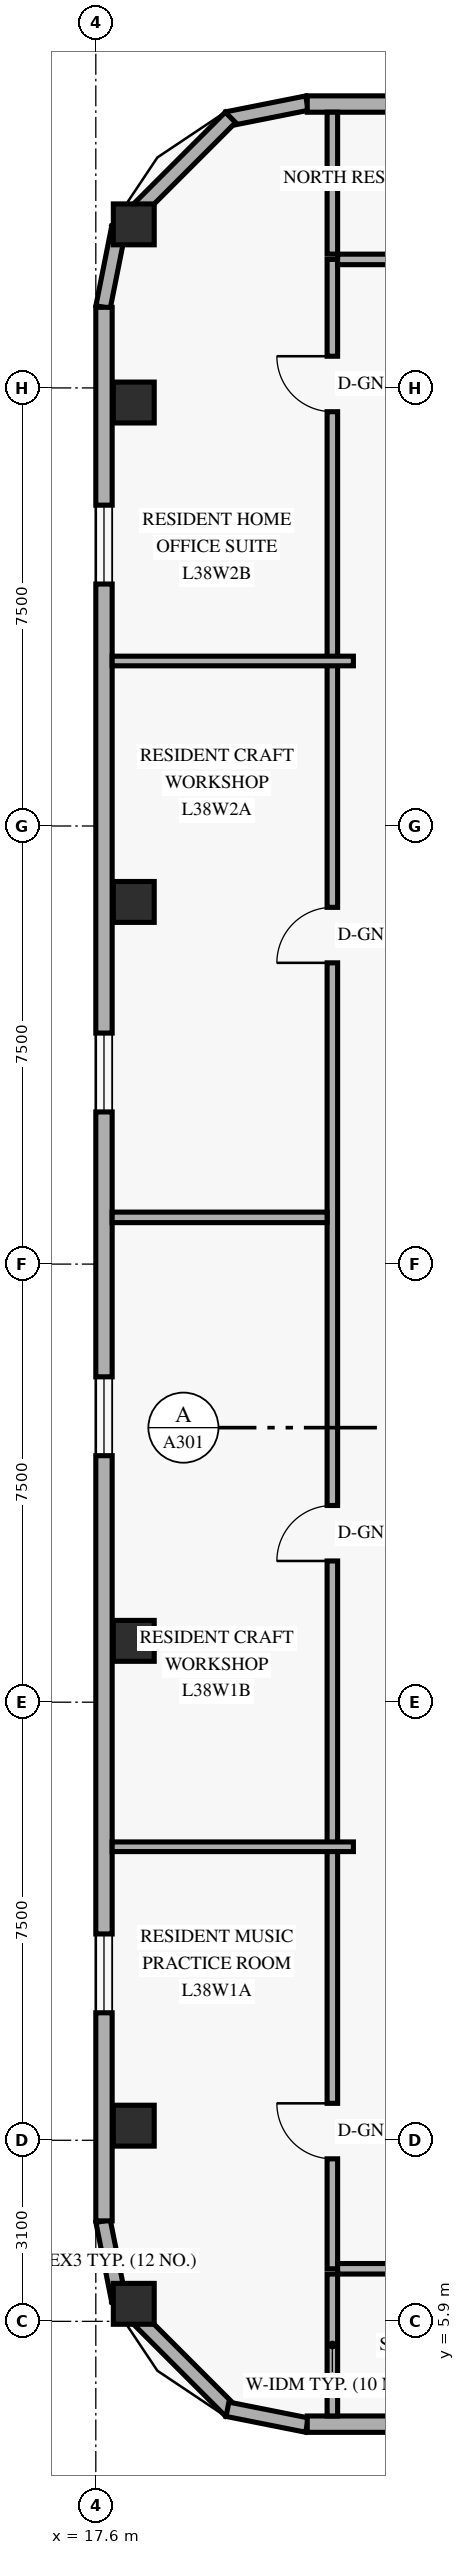
"""IFC4 building model, lengths in metres.
Left out: names, types, materials, properties, quantities, classifications, styles, units other than length and angle.
Written with IfcOpenShell. Run it as: python <this file> out.ifc"""

import sys

from ifc_helpers import new_model, si_unit, direction, frame, frame_2d, origin, origin_2d, place, context, subcontext, project, spatial, rectangle, extrude, element, fill, save


model = new_model("IFC4")
c1 = context("Model", 3, precision=1e-05, world=origin(), true_north=direction((0.0, 1.0)))
c2 = subcontext(c1, "Body", "Model", "MODEL_VIEW")
j1 = project(units=[si_unit("LENGTHUNIT", "METRE"), si_unit("PLANEANGLEUNIT", "RADIAN")], contexts=[c1])
p1 = place(None, origin())
s1 = spatial("IfcSite", under=j1, at=p1, CompositionType="ELEMENT")
p2 = place(p1, origin())
s2 = spatial("IfcBuilding", under=s1, at=p2, CompositionType="ELEMENT")
p3 = place(p2, frame((0.0, 0.0, 148.2)))
s3 = spatial("IfcBuildingStorey", under=s2, at=p3, CompositionType="ELEMENT", Elevation=148.2)
for number, where, z_axis, x_axis in (
    (1, (18.25, 6.2, 0.0), (0.0, 0.0, 1.0), (1.0, 0.0, 0.0)),
    (2, (18.25, 9.25, 0.0), (0.0, 0.0, 1.0), (1.0, 0.0, 0.0)),
    (3, (18.25, 17.55, 0.0), (0.0, 0.0, 1.0), (1.0, 0.0, 0.0)),
    (4, (18.25, 30.2, 0.0), (0.0, 0.0, 1.0), (1.0, 0.0, 0.0)),
    (5, (18.25, 38.75, 0.0), (0.0, 0.0, 1.0), (1.0, 0.0, 0.0)),
    (6, (18.25, 41.8, 0.0), (0.0, 0.0, 1.0), (1.0, 0.0, 0.0)),
):
    element("IfcColumn", number, at=place(p3, frame(where, z_axis=z_axis, x_axis=x_axis)), inside=s3, PredefinedType="COLUMN", context=c2, shape_type="SweptSolid", body=[
        extrude(rectangle(XDim=0.7, YDim=0.7, at=origin_2d()), origin(), (0.0, 0.0, 1.0), 3.6),
    ])
p4 = place(p3, frame((17.724, 7.616, 0.0), z_axis=(0.0, 0.0, 1.0), x_axis=(0.195135625965, -0.9807762678, 0.0)))
e7 = element("IfcWall", 7, at=p4, inside=s3, PredefinedType="SOLIDWALL", context=c2, shape_type="SweptSolid", body=[
    extrude(rectangle(XDim=1.389, YDim=0.25, at=frame_2d((0.694, 0.0))), origin(), (0.0, 0.0, 1.0), 3.36),
])
p5 = place(p3, frame((17.968, 6.305, 0.0), z_axis=(0.0, 0.0, 1.0), x_axis=(0.707106781187, -0.707106781187, 0.0)))
e8 = element("IfcWall", 8, at=p5, inside=s3, PredefinedType="SOLIDWALL", context=c2, shape_type="SweptSolid", body=[
    extrude(rectangle(XDim=2.739, YDim=0.25, at=frame_2d((1.37, 0.0))), origin(), (0.0, 0.0, 1.0), 3.36),
])
for number, where, z_axis, x_axis in (
    (9, (19.854, 4.395, 0.0), (0.0, 0.0, 1.0), (0.981, -0.195, 0.0)),
    (10, (21.217, 43.876, 0.0), (0.0, 0.0, 1.0), (-0.981, -0.195, 0.0)),
):
    element("IfcWall", number, at=place(p3, frame(where, z_axis=z_axis, x_axis=x_axis)), inside=s3, PredefinedType="SOLIDWALL", context=c2, shape_type="SweptSolid", body=[
        extrude(rectangle(XDim=1.389, YDim=0.25, at=frame_2d((0.694, 0.0))), origin(), (0.0, 0.0, 1.0), 3.36),
    ])
p6 = place(p3, frame((19.905, 43.632, 0.0), z_axis=(0.0, 0.0, 1.0), x_axis=(-0.707106781187, -0.707106781187, 0.0)))
e11 = element("IfcWall", 11, at=p6, inside=s3, PredefinedType="SOLIDWALL", context=c2, shape_type="SweptSolid", body=[
    extrude(rectangle(XDim=2.739, YDim=0.25, at=frame_2d((1.37, 0.0))), origin(), (0.0, 0.0, 1.0), 3.36),
])
p7 = place(p3, frame((17.995, 41.746, 0.0), z_axis=(0.0, 0.0, 1.0), x_axis=(-0.195135625965, -0.9807762678, 0.0)))
e12 = element("IfcWall", 12, at=p7, inside=s3, PredefinedType="SOLIDWALL", context=c2, shape_type="SweptSolid", body=[
    extrude(rectangle(XDim=1.389, YDim=0.25, at=frame_2d((0.694, 0.0))), origin(), (0.0, 0.0, 1.0), 3.36),
])
p8 = place(p3, frame((21.22, 4.14, 0.0), z_axis=(0.0, 0.0, 1.0), x_axis=(1.0, 0.0, 0.0)))
e13 = element("IfcWall", 13, at=p8, inside=s3, PredefinedType="SOLIDWALL", context=c2, shape_type="SweptSolid", body=[
    extrude(rectangle(XDim=33.76, YDim=0.28, at=frame_2d((16.88, 0.0))), origin(), (0.0, 0.0, 1.0), 3.36),
])
p9 = place(p8, frame((2.905, 0.0, 0.85)))
e14 = element("IfcOpeningElement", 14, at=p9, cuts=e13, PredefinedType="OPENING", context=c2, shape_type="SweptSolid", body=[
    extrude(rectangle(XDim=1.2, YDim=1.5, at=frame_2d((0.6, 0.75))), frame((0.0, 0.15, 0.0), z_axis=(0.0, -1.0, 0.0), x_axis=(1.0, 0.0, 0.0)), (0.0, 0.0, 1.0), 0.3),
])
p10 = place(p8, frame((9.79, 0.0, 0.85)))
e15 = element("IfcOpeningElement", 15, at=p10, cuts=e13, PredefinedType="OPENING", context=c2, shape_type="SweptSolid", body=[
    extrude(rectangle(XDim=1.2, YDim=1.5, at=frame_2d((0.6, 0.75))), frame((0.0, 0.15, 0.0), z_axis=(0.0, -1.0, 0.0), x_axis=(1.0, 0.0, 0.0)), (0.0, 0.0, 1.0), 0.3),
])
p11 = place(p8, frame((15.065, 0.0, 0.85)))
e16 = element("IfcOpeningElement", 16, at=p11, cuts=e13, PredefinedType="OPENING", context=c2, shape_type="SweptSolid", body=[
    extrude(rectangle(XDim=1.2, YDim=1.5, at=frame_2d((0.6, 0.75))), frame((0.0, 0.15, 0.0), z_axis=(0.0, -1.0, 0.0), x_axis=(1.0, 0.0, 0.0)), (0.0, 0.0, 1.0), 0.3),
])
p12 = place(p8, frame((19.625, 0.0, 0.85)))
e17 = element("IfcOpeningElement", 17, at=p12, cuts=e13, PredefinedType="OPENING", context=c2, shape_type="SweptSolid", body=[
    extrude(rectangle(XDim=1.2, YDim=1.5, at=frame_2d((0.6, 0.75))), frame((0.0, 0.15, 0.0), z_axis=(0.0, -1.0, 0.0), x_axis=(1.0, 0.0, 0.0)), (0.0, 0.0, 1.0), 0.3),
])
p13 = place(p8, frame((24.45, 0.0, 0.85)))
e18 = element("IfcOpeningElement", 18, at=p13, cuts=e13, PredefinedType="OPENING", context=c2, shape_type="SweptSolid", body=[
    extrude(rectangle(XDim=1.2, YDim=1.5, at=frame_2d((0.6, 0.75))), frame((0.0, 0.15, 0.0), z_axis=(0.0, -1.0, 0.0), x_axis=(1.0, 0.0, 0.0)), (0.0, 0.0, 1.0), 0.3),
])
p14 = place(p8, frame((27.08, 0.0, 0.85)))
e19 = element("IfcOpeningElement", 19, at=p14, cuts=e13, PredefinedType="OPENING", context=c2, shape_type="SweptSolid", body=[
    extrude(rectangle(XDim=1.2, YDim=1.5, at=frame_2d((0.6, 0.75))), frame((0.0, 0.15, 0.0), z_axis=(0.0, -1.0, 0.0), x_axis=(1.0, 0.0, 0.0)), (0.0, 0.0, 1.0), 0.3),
])
p15 = place(p8, frame((30.57, 0.0, 0.85)))
e20 = element("IfcOpeningElement", 20, at=p15, cuts=e13, PredefinedType="OPENING", context=c2, shape_type="SweptSolid", body=[
    extrude(rectangle(XDim=1.2, YDim=1.5, at=frame_2d((0.6, 0.75))), frame((0.0, 0.15, 0.0), z_axis=(0.0, -1.0, 0.0), x_axis=(1.0, 0.0, 0.0)), (0.0, 0.0, 1.0), 0.3),
])
p16 = place(p3, frame((54.98, 43.86, 0.0), z_axis=(0.0, 0.0, 1.0), x_axis=(-1.0, 0.0, 0.0)))
e21 = element("IfcWall", 21, at=p16, inside=s3, PredefinedType="SOLIDWALL", context=c2, shape_type="SweptSolid", body=[
    extrude(rectangle(XDim=33.76, YDim=0.28, at=frame_2d((16.88, 0.0))), origin(), (0.0, 0.0, 1.0), 3.36),
])
p17 = place(p16, frame((28.355, 0.0, 0.85)))
e22 = element("IfcOpeningElement", 22, at=p17, cuts=e21, PredefinedType="OPENING", context=c2, shape_type="SweptSolid", body=[
    extrude(rectangle(XDim=1.2, YDim=1.5, at=frame_2d((0.6, 0.75))), frame((0.0, 0.15, 0.0), z_axis=(0.0, -1.0, 0.0), x_axis=(1.0, 0.0, 0.0)), (0.0, 0.0, 1.0), 0.3),
])
p18 = place(p16, frame((21.47, 0.0, 0.85)))
e23 = element("IfcOpeningElement", 23, at=p18, cuts=e21, PredefinedType="OPENING", context=c2, shape_type="SweptSolid", body=[
    extrude(rectangle(XDim=1.2, YDim=1.5, at=frame_2d((0.6, 0.75))), frame((0.0, 0.15, 0.0), z_axis=(0.0, -1.0, 0.0), x_axis=(1.0, 0.0, 0.0)), (0.0, 0.0, 1.0), 0.3),
])
p19 = place(p16, frame((15.165, 0.0, 0.85)))
e24 = element("IfcOpeningElement", 24, at=p19, cuts=e21, PredefinedType="OPENING", context=c2, shape_type="SweptSolid", body=[
    extrude(rectangle(XDim=1.2, YDim=1.5, at=frame_2d((0.6, 0.75))), frame((0.0, 0.15, 0.0), z_axis=(0.0, -1.0, 0.0), x_axis=(1.0, 0.0, 0.0)), (0.0, 0.0, 1.0), 0.3),
])
p20 = place(p16, frame((8.875, 0.0, 0.85)))
e25 = element("IfcOpeningElement", 25, at=p20, cuts=e21, PredefinedType="OPENING", context=c2, shape_type="SweptSolid", body=[
    extrude(rectangle(XDim=1.2, YDim=1.5, at=frame_2d((0.6, 0.75))), frame((0.0, 0.15, 0.0), z_axis=(0.0, -1.0, 0.0), x_axis=(1.0, 0.0, 0.0)), (0.0, 0.0, 1.0), 0.3),
])
p21 = place(p16, frame((5.48, 0.0, 0.85)))
e26 = element("IfcOpeningElement", 26, at=p21, cuts=e21, PredefinedType="OPENING", context=c2, shape_type="SweptSolid", body=[
    extrude(rectangle(XDim=1.2, YDim=1.5, at=frame_2d((0.6, 0.75))), frame((0.0, 0.15, 0.0), z_axis=(0.0, -1.0, 0.0), x_axis=(1.0, 0.0, 0.0)), (0.0, 0.0, 1.0), 0.3),
])
p22 = place(p16, frame((1.99, 0.0, 0.85)))
e27 = element("IfcOpeningElement", 27, at=p22, cuts=e21, PredefinedType="OPENING", context=c2, shape_type="SweptSolid", body=[
    extrude(rectangle(XDim=1.2, YDim=1.5, at=frame_2d((0.6, 0.75))), frame((0.0, 0.15, 0.0), z_axis=(0.0, -1.0, 0.0), x_axis=(1.0, 0.0, 0.0)), (0.0, 0.0, 1.0), 0.3),
])
p23 = place(p3, frame((17.74, 40.38, 0.0), z_axis=(0.0, 0.0, 1.0), x_axis=(0.0, -1.0, 0.0)))
e28 = element("IfcWall", 28, at=p23, inside=s3, PredefinedType="SOLIDWALL", context=c2, shape_type="SweptSolid", body=[
    extrude(rectangle(XDim=32.76, YDim=0.28, at=frame_2d((16.38, 0.0))), origin(), (0.0, 0.0, 1.0), 3.36),
])
p24 = place(p23, frame((27.847, 0.0, 0.85)))
e29 = element("IfcOpeningElement", 29, at=p24, cuts=e28, PredefinedType="OPENING", context=c2, shape_type="SweptSolid", body=[
    extrude(rectangle(XDim=1.35, YDim=1.55, at=frame_2d((0.675, 0.775))), frame((0.0, 0.15, 0.0), z_axis=(0.0, -1.0, 0.0), x_axis=(1.0, 0.0, 0.0)), (0.0, 0.0, 1.0), 0.3),
])
p25 = place(p23, frame((18.31, 0.0, 0.85)))
e30 = element("IfcOpeningElement", 30, at=p25, cuts=e28, PredefinedType="OPENING", context=c2, shape_type="SweptSolid", body=[
    extrude(rectangle(XDim=1.35, YDim=1.55, at=frame_2d((0.675, 0.775))), frame((0.0, 0.15, 0.0), z_axis=(0.0, -1.0, 0.0), x_axis=(1.0, 0.0, 0.0)), (0.0, 0.0, 1.0), 0.3),
])
p26 = place(p23, frame((12.425, 0.0, 0.85)))
e31 = element("IfcOpeningElement", 31, at=p26, cuts=e28, PredefinedType="OPENING", context=c2, shape_type="SweptSolid", body=[
    extrude(rectangle(XDim=1.35, YDim=1.55, at=frame_2d((0.675, 0.775))), frame((0.0, 0.15, 0.0), z_axis=(0.0, -1.0, 0.0), x_axis=(1.0, 0.0, 0.0)), (0.0, 0.0, 1.0), 0.3),
])
p27 = place(p23, frame((3.387, 0.0, 0.85)))
e32 = element("IfcOpeningElement", 32, at=p27, cuts=e28, PredefinedType="OPENING", context=c2, shape_type="SweptSolid", body=[
    extrude(rectangle(XDim=1.35, YDim=1.55, at=frame_2d((0.675, 0.775))), frame((0.0, 0.15, 0.0), z_axis=(0.0, -1.0, 0.0), x_axis=(1.0, 0.0, 0.0)), (0.0, 0.0, 1.0), 0.3),
])
p28 = place(p3, frame((21.65, 6.8, 0.0), z_axis=(0.0, 0.0, 1.0), x_axis=(0.0, 1.0, 0.0)))
e33 = element("IfcWall", 33, at=p28, inside=s3, PredefinedType="STANDARD", context=c2, shape_type="SweptSolid", body=[
    extrude(rectangle(XDim=34.4, YDim=0.18, at=frame_2d((17.2, 0.0))), origin(), (0.0, 0.0, 1.0), 2.73),
])
p29 = place(p28, frame((1.883, 0.0, 0.0)))
e34 = element("IfcOpeningElement", 34, at=p29, cuts=e33, PredefinedType="OPENING", context=c2, shape_type="SweptSolid", body=[
    extrude(rectangle(XDim=0.95, YDim=2.15, at=frame_2d((0.475, 1.075))), frame((0.0, 0.1, 0.0), z_axis=(0.0, -1.0, 0.0), x_axis=(1.0, 0.0, 0.0)), (0.0, 0.0, 1.0), 0.2),
])
p30 = place(p28, frame((12.117, 0.0, 0.0)))
e35 = element("IfcOpeningElement", 35, at=p30, cuts=e33, PredefinedType="OPENING", context=c2, shape_type="SweptSolid", body=[
    extrude(rectangle(XDim=0.95, YDim=2.15, at=frame_2d((0.475, 1.075))), frame((0.0, 0.1, 0.0), z_axis=(0.0, -1.0, 0.0), x_axis=(1.0, 0.0, 0.0)), (0.0, 0.0, 1.0), 0.2),
])
p31 = place(p28, frame((22.357, 0.0, 0.0)))
e36 = element("IfcOpeningElement", 36, at=p31, cuts=e33, PredefinedType="OPENING", context=c2, shape_type="SweptSolid", body=[
    extrude(rectangle(XDim=0.95, YDim=2.15, at=frame_2d((0.475, 1.075))), frame((0.0, 0.1, 0.0), z_axis=(0.0, -1.0, 0.0), x_axis=(1.0, 0.0, 0.0)), (0.0, 0.0, 1.0), 0.2),
])
p32 = place(p28, frame((31.792, 0.0, 0.0)))
e37 = element("IfcOpeningElement", 37, at=p32, cuts=e33, PredefinedType="OPENING", context=c2, shape_type="SweptSolid", body=[
    extrude(rectangle(XDim=0.95, YDim=2.15, at=frame_2d((0.475, 1.075))), frame((0.0, 0.1, 0.0), z_axis=(0.0, -1.0, 0.0), x_axis=(1.0, 0.0, 0.0)), (0.0, 0.0, 1.0), 0.2),
])
p33 = place(p3, frame((21.74, 6.8, 0.0), z_axis=(0.0, 0.0, 1.0), x_axis=(1.0, 0.0, 0.0)))
e38 = element("IfcWall", 38, at=p33, inside=s3, PredefinedType="STANDARD", context=c2, shape_type="SweptSolid", body=[
    extrude(rectangle(XDim=13.68, YDim=0.18, at=frame_2d((6.84, 0.0))), origin(), (0.0, 0.0, 1.0), 2.73),
])
p34 = place(p33, frame((0.97, 0.0, 0.0)))
e39 = element("IfcOpeningElement", 39, at=p34, cuts=e38, PredefinedType="OPENING", context=c2, shape_type="SweptSolid", body=[
    extrude(rectangle(XDim=0.95, YDim=2.15, at=frame_2d((0.475, 1.075))), frame((0.0, 0.1, 0.0), z_axis=(0.0, -1.0, 0.0), x_axis=(1.0, 0.0, 0.0)), (0.0, 0.0, 1.0), 0.2),
])
p35 = place(p33, frame((9.11, 0.0, 0.0)))
e40 = element("IfcOpeningElement", 40, at=p35, cuts=e38, PredefinedType="OPENING", context=c2, shape_type="SweptSolid", body=[
    extrude(rectangle(XDim=0.95, YDim=2.15, at=frame_2d((0.475, 1.075))), frame((0.0, 0.1, 0.0), z_axis=(0.0, -1.0, 0.0), x_axis=(1.0, 0.0, 0.0)), (0.0, 0.0, 1.0), 0.2),
])
p36 = place(p3, frame((21.74, 41.2, 0.0), z_axis=(0.0, 0.0, 1.0), x_axis=(1.0, 0.0, 0.0)))
e41 = element("IfcWall", 41, at=p36, inside=s3, PredefinedType="STANDARD", context=c2, shape_type="SweptSolid", body=[
    extrude(rectangle(XDim=13.68, YDim=0.18, at=frame_2d((6.84, 0.0))), origin(), (0.0, 0.0, 1.0), 2.73),
])
p37 = place(p36, frame((2.95, 0.0, 0.0)))
e42 = element("IfcOpeningElement", 42, at=p37, cuts=e41, PredefinedType="OPENING", context=c2, shape_type="SweptSolid", body=[
    extrude(rectangle(XDim=0.95, YDim=2.15, at=frame_2d((0.475, 1.075))), frame((0.0, 0.1, 0.0), z_axis=(0.0, -1.0, 0.0), x_axis=(1.0, 0.0, 0.0)), (0.0, 0.0, 1.0), 0.2),
])
p38 = place(p36, frame((10.11, 0.0, 0.0)))
e43 = element("IfcOpeningElement", 43, at=p38, cuts=e41, PredefinedType="OPENING", context=c2, shape_type="SweptSolid", body=[
    extrude(rectangle(XDim=0.95, YDim=2.15, at=frame_2d((0.475, 1.075))), frame((0.0, 0.1, 0.0), z_axis=(0.0, -1.0, 0.0), x_axis=(1.0, 0.0, 0.0)), (0.0, 0.0, 1.0), 0.2),
])
for number, where, z_axis, x_axis in (
    (44, (21.65, 4.28, 0.0), (0.0, 0.0, 1.0), (0.0, 1.0, 0.0)),
    (45, (21.65, 41.29, 0.0), (0.0, 0.0, 1.0), (0.0, 1.0, 0.0)),
):
    element("IfcWall", number, at=place(p3, frame(where, z_axis=z_axis, x_axis=x_axis)), inside=s3, PredefinedType="PARTITIONING", context=c2, shape_type="SweptSolid", body=[
        extrude(rectangle(XDim=2.43, YDim=0.18, at=frame_2d((1.215, 0.0))), origin(), (0.0, 0.0, 1.0), 2.879),
    ])
p39 = place(p3, frame((17.88, 14.025, 0.0), z_axis=(0.0, 0.0, 1.0), x_axis=(1.0, 0.0, 0.0)))
e46 = element("IfcWall", 46, at=p39, inside=s3, PredefinedType="PARTITIONING", context=c2, shape_type="SweptSolid", body=[
    extrude(rectangle(XDim=4.13, YDim=0.165, at=frame_2d((2.065, 0.0))), origin(), (0.0, 0.0, 1.0), 2.879),
])
p40 = place(p3, frame((17.88, 24.8, 0.0), z_axis=(0.0, 0.0, 1.0), x_axis=(1.0, 0.0, 0.0)))
e47 = element("IfcWall", 47, at=p40, inside=s3, PredefinedType="PARTITIONING", context=c2, shape_type="SweptSolid", body=[
    extrude(rectangle(XDim=3.68, YDim=0.18, at=frame_2d((1.84, 0.0))), origin(), (0.0, 0.0, 1.0), 2.879),
])
p41 = place(p3, frame((17.88, 34.325, 0.0), z_axis=(0.0, 0.0, 1.0), x_axis=(1.0, 0.0, 0.0)))
e48 = element("IfcWall", 48, at=p41, inside=s3, PredefinedType="PARTITIONING", context=c2, shape_type="SweptSolid", body=[
    extrude(rectangle(XDim=4.13, YDim=0.165, at=frame_2d((2.065, 0.0))), origin(), (0.0, 0.0, 1.0), 2.879),
])
p42 = place(p24, origin())
e49 = element("IfcWindow", 49, at=p42, inside=s3, PartitioningType="SINGLE_PANEL", PredefinedType="WINDOW", context=c2, shape_type="SweptSolid", body=[
    extrude(rectangle(XDim=1.35, YDim=1.55, at=frame_2d((0.675, 0.775))), frame((0.0, 0.03, 0.0), z_axis=(0.0, -1.0, 0.0), x_axis=(1.0, 0.0, 0.0)), (0.0, 0.0, 1.0), 0.06),
])
fill(e29, e49)
p43 = place(p25, origin())
e50 = element("IfcWindow", 50, at=p43, inside=s3, PartitioningType="SINGLE_PANEL", PredefinedType="WINDOW", context=c2, shape_type="SweptSolid", body=[
    extrude(rectangle(XDim=1.35, YDim=1.55, at=frame_2d((0.675, 0.775))), frame((0.0, 0.03, 0.0), z_axis=(0.0, -1.0, 0.0), x_axis=(1.0, 0.0, 0.0)), (0.0, 0.0, 1.0), 0.06),
])
fill(e30, e50)
p44 = place(p26, origin())
e51 = element("IfcWindow", 51, at=p44, inside=s3, PartitioningType="SINGLE_PANEL", PredefinedType="WINDOW", context=c2, shape_type="SweptSolid", body=[
    extrude(rectangle(XDim=1.35, YDim=1.55, at=frame_2d((0.675, 0.775))), frame((0.0, 0.03, 0.0), z_axis=(0.0, -1.0, 0.0), x_axis=(1.0, 0.0, 0.0)), (0.0, 0.0, 1.0), 0.06),
])
fill(e31, e51)
p45 = place(p27, origin())
e52 = element("IfcWindow", 52, at=p45, inside=s3, PartitioningType="SINGLE_PANEL", PredefinedType="WINDOW", context=c2, shape_type="SweptSolid", body=[
    extrude(rectangle(XDim=1.35, YDim=1.55, at=frame_2d((0.675, 0.775))), frame((0.0, 0.03, 0.0), z_axis=(0.0, -1.0, 0.0), x_axis=(1.0, 0.0, 0.0)), (0.0, 0.0, 1.0), 0.06),
])
fill(e32, e52)
p46 = place(p29, origin())
e53 = element("IfcDoor", 53, at=p46, inside=s3, OperationType="SINGLE_SWING_RIGHT", PredefinedType="DOOR", context=c2, shape_type="SweptSolid", body=[
    extrude(rectangle(XDim=0.95, YDim=2.15, at=frame_2d((0.475, 1.075))), frame((0.0, 0.025, 0.0), z_axis=(0.0, -1.0, 0.0), x_axis=(1.0, 0.0, 0.0)), (0.0, 0.0, 1.0), 0.05),
])
fill(e34, e53)
p47 = place(p30, origin())
e54 = element("IfcDoor", 54, at=p47, inside=s3, OperationType="SINGLE_SWING_LEFT", PredefinedType="DOOR", context=c2, shape_type="SweptSolid", body=[
    extrude(rectangle(XDim=0.95, YDim=2.15, at=frame_2d((0.475, 1.075))), frame((0.0, 0.025, 0.0), z_axis=(0.0, -1.0, 0.0), x_axis=(1.0, 0.0, 0.0)), (0.0, 0.0, 1.0), 0.05),
])
fill(e35, e54)
p48 = place(p31, origin())
e55 = element("IfcDoor", 55, at=p48, inside=s3, OperationType="SINGLE_SWING_LEFT", PredefinedType="DOOR", context=c2, shape_type="SweptSolid", body=[
    extrude(rectangle(XDim=0.95, YDim=2.15, at=frame_2d((0.475, 1.075))), frame((0.0, 0.025, 0.0), z_axis=(0.0, -1.0, 0.0), x_axis=(1.0, 0.0, 0.0)), (0.0, 0.0, 1.0), 0.05),
])
fill(e36, e55)
p49 = place(p32, origin())
e56 = element("IfcDoor", 56, at=p49, inside=s3, OperationType="SINGLE_SWING_RIGHT", PredefinedType="DOOR", context=c2, shape_type="SweptSolid", body=[
    extrude(rectangle(XDim=0.95, YDim=2.15, at=frame_2d((0.475, 1.075))), frame((0.0, 0.025, 0.0), z_axis=(0.0, -1.0, 0.0), x_axis=(1.0, 0.0, 0.0)), (0.0, 0.0, 1.0), 0.05),
])
fill(e37, e56)
save(model, sys.argv[1])
